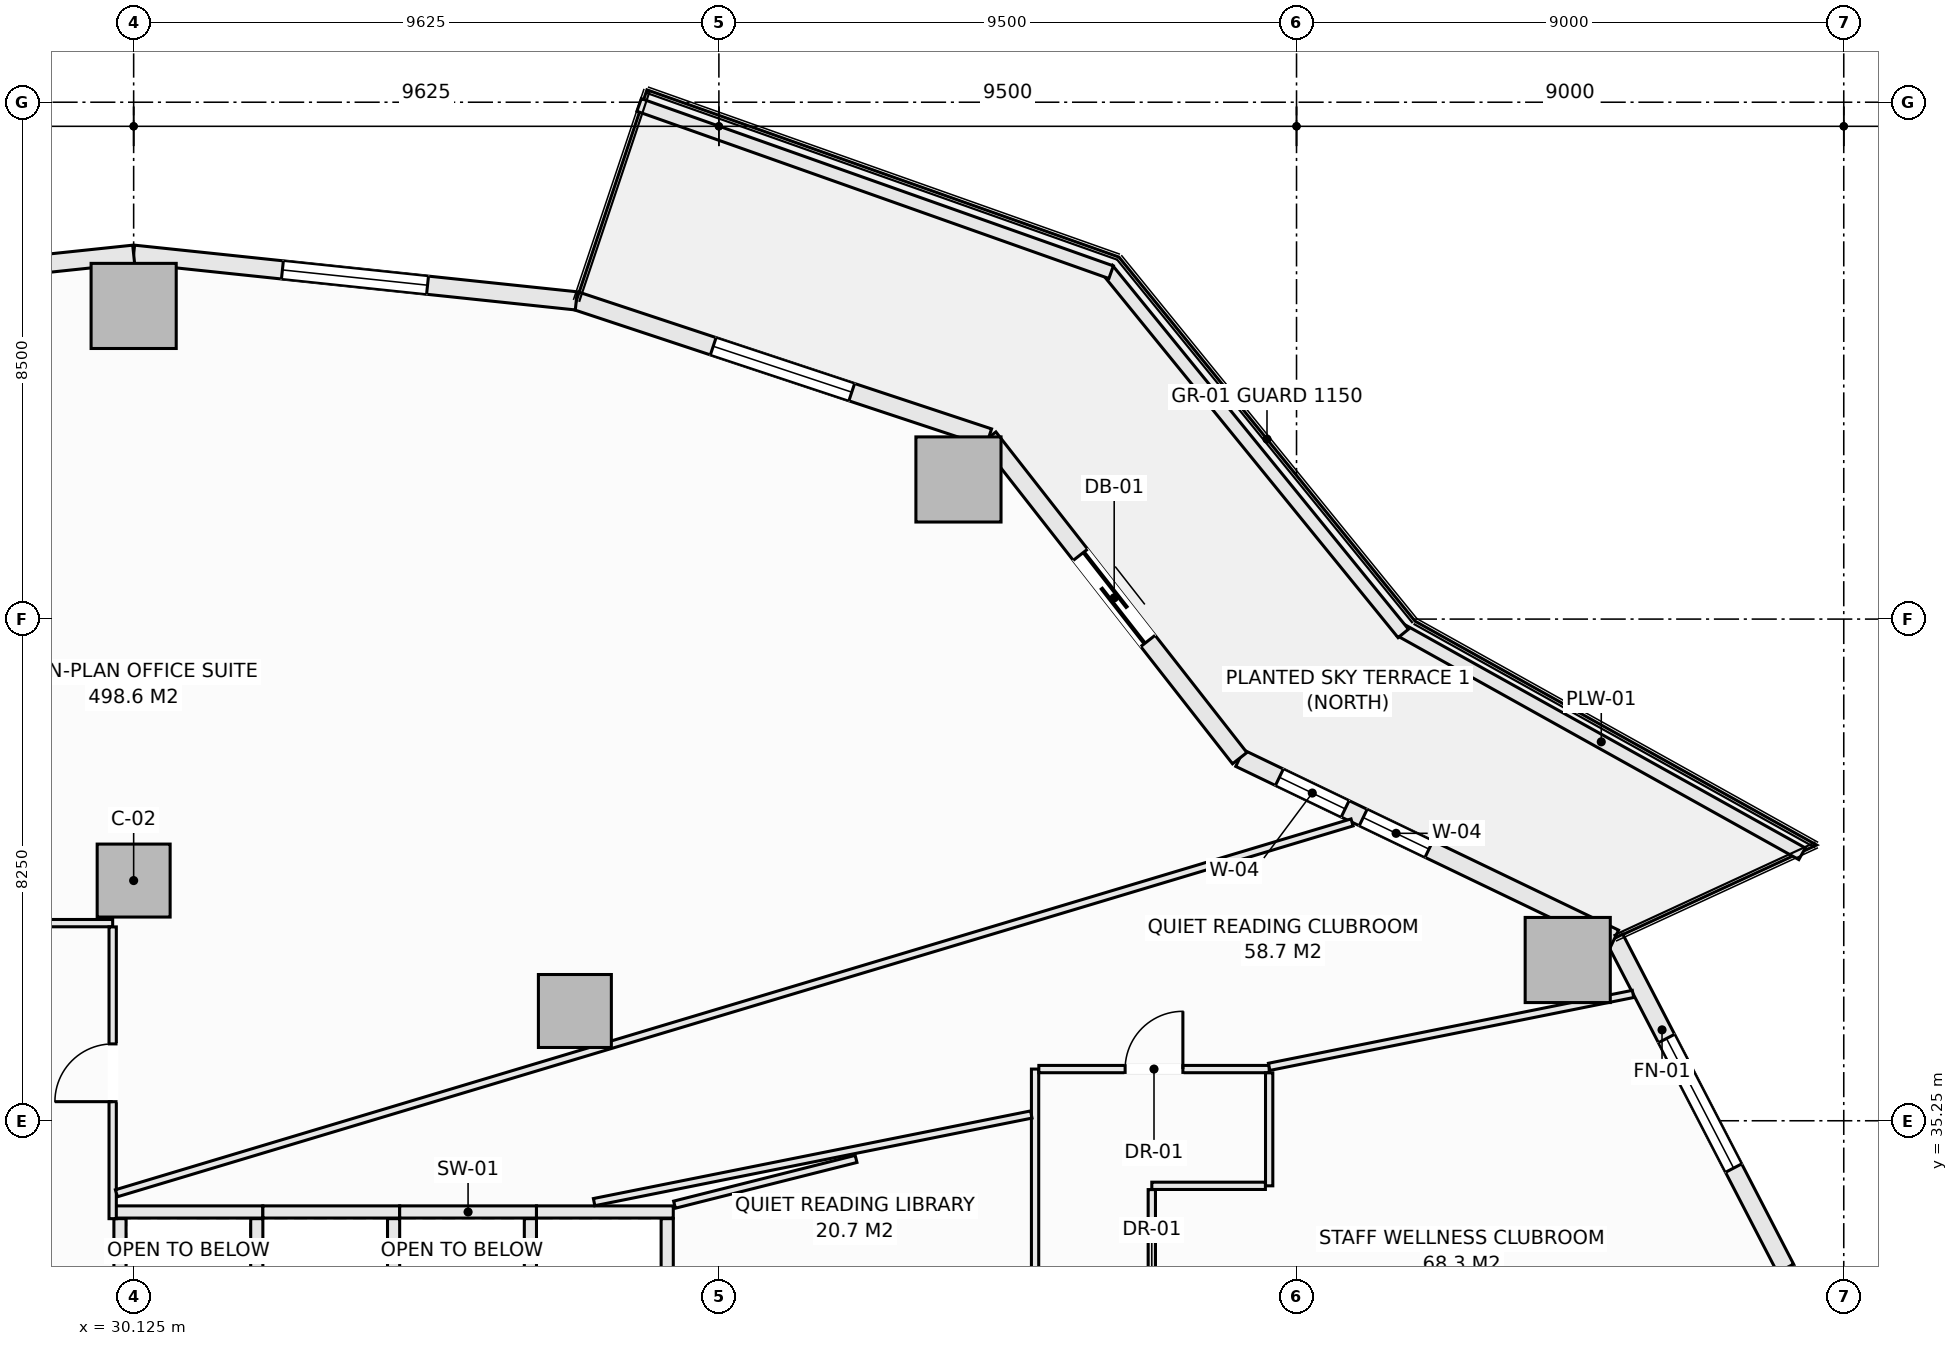
"""IFC4 building model, lengths in metres.
Left out: names, types, materials, properties, quantities, classifications, styles, units other than length and angle.
Written with IfcOpenShell. Run it as: python <this file> out.ifc"""

import sys

from ifc_helpers import new_model, si_unit, direction, frame, frame_2d, origin, origin_2d, place, context, subcontext, project, spatial, rectangle, extrude, element, fill, save


model = new_model("IFC4")
c1 = context("Model", 3, precision=1e-05, world=origin(), true_north=direction((0.0, 1.0)))
c2 = subcontext(c1, "Body", "Model", "MODEL_VIEW")
j1 = project(units=[si_unit("LENGTHUNIT", "METRE"), si_unit("PLANEANGLEUNIT", "RADIAN")], contexts=[c1])
p1 = place(None, origin())
s1 = spatial("IfcSite", under=j1, at=p1, CompositionType="ELEMENT")
p2 = place(p1, origin())
s2 = spatial("IfcBuilding", under=s1, at=p2, CompositionType="ELEMENT")
p3 = place(p2, frame((0.0, 0.0, 49.6)))
s3 = spatial("IfcBuildingStorey", under=s2, at=p3, CompositionType="ELEMENT", Elevation=49.6)
for number, where, z_axis, x_axis in (
    (1, (53.71, 37.894, -0.28), (0.0, 0.0, 1.0), (1.0, 0.0, 0.0)),
    (2, (43.69, 45.796, -0.28), (0.0, 0.0, 1.0), (1.0, 0.0, 0.0)),
    (3, (30.125, 48.65, -0.28), (0.0, 0.0, 1.0), (1.0, 0.0, 0.0)),
):
    element("IfcColumn", number, at=place(p3, frame(where, z_axis=z_axis, x_axis=x_axis)), inside=s3, PredefinedType="COLUMN", context=c2, shape_type="SweptSolid", body=[
        extrude(rectangle(XDim=1.4, YDim=1.4, at=origin_2d()), origin(), (0.0, 0.0, 1.0), 3.85),
    ])
for number, where, z_axis, x_axis in (
    (4, (37.382, 37.055, -0.28), (0.0, 0.0, 1.0), (1.0, 0.0, 0.0)),
    (5, (30.125, 39.2, -0.28), (0.0, 0.0, 1.0), (1.0, 0.0, 0.0)),
):
    element("IfcColumn", number, at=place(p3, frame(where, z_axis=z_axis, x_axis=x_axis)), inside=s3, PredefinedType="COLUMN", context=c2, shape_type="SweptSolid", body=[
        extrude(rectangle(XDim=1.2, YDim=1.2, at=origin_2d()), origin(), (0.0, 0.0, 1.0), 3.85),
    ])
p4 = place(p3, frame((54.482, 38.25, 0.0), z_axis=(0.0, 0.0, 1.0), x_axis=(0.459809804413, -0.88801742312, 0.0)))
e6 = element("IfcWall", 6, at=p4, inside=s3, PredefinedType="SOLIDWALL", context=c2, shape_type="SweptSolid", body=[
    extrude(rectangle(XDim=6.111, YDim=0.3, at=frame_2d((3.055, 0.0))), origin(), (0.0, 0.0, 1.0), 3.093),
])
p5 = place(p4, frame((1.855, 0.0, 0.85)))
e7 = element("IfcOpeningElement", 7, at=p5, cuts=e6, PredefinedType="OPENING", context=c2, shape_type="SweptSolid", body=[
    extrude(rectangle(XDim=2.4, YDim=1.9, at=frame_2d((1.2, 0.95))), frame((0.0, 0.16, 0.0), z_axis=(0.0, -1.0, 0.0), x_axis=(1.0, 0.0, 0.0)), (0.0, 0.0, 1.0), 0.32),
])
p6 = place(p3, frame((48.315, 41.213, 0.0), z_axis=(0.0, 0.0, 1.0), x_axis=(0.901360393999, -0.433069786673, 0.0)))
e8 = element("IfcWall", 8, at=p6, inside=s3, PredefinedType="SOLIDWALL", context=c2, shape_type="SweptSolid", body=[
    extrude(rectangle(XDim=6.842, YDim=0.3, at=frame_2d((3.421, 0.0))), origin(), (0.0, 0.0, 1.0), 3.093),
])
p7 = place(p6, frame((0.724, 0.0, 0.85)))
e9 = element("IfcOpeningElement", 9, at=p7, cuts=e8, PredefinedType="OPENING", context=c2, shape_type="SweptSolid", body=[
    extrude(rectangle(XDim=1.2, YDim=1.9, at=frame_2d((0.6, 0.95))), frame((0.0, 0.16, 0.0), z_axis=(0.0, -1.0, 0.0), x_axis=(1.0, 0.0, 0.0)), (0.0, 0.0, 1.0), 0.32),
])
p8 = place(p6, frame((2.253, 0.0, 0.85)))
e10 = element("IfcOpeningElement", 10, at=p8, cuts=e8, PredefinedType="OPENING", context=c2, shape_type="SweptSolid", body=[
    extrude(rectangle(XDim=1.2, YDim=1.9, at=frame_2d((0.6, 0.95))), frame((0.0, 0.16, 0.0), z_axis=(0.0, -1.0, 0.0), x_axis=(1.0, 0.0, 0.0)), (0.0, 0.0, 1.0), 0.32),
])
p9 = place(p3, frame((44.188, 46.486, 0.0), z_axis=(0.0, 0.0, 1.0), x_axis=(0.616421309777, -0.787416515482, 0.0)))
e11 = element("IfcWall", 11, at=p9, inside=s3, PredefinedType="SOLIDWALL", context=c2, shape_type="SweptSolid", body=[
    extrude(rectangle(XDim=6.696, YDim=0.3, at=frame_2d((3.348, 0.0))), origin(), (0.0, 0.0, 1.0), 3.093),
])
p10 = place(p9, frame((2.448, 0.0, 0.0)))
e12 = element("IfcOpeningElement", 12, at=p10, cuts=e11, PredefinedType="OPENING", context=c2, shape_type="SweptSolid", body=[
    extrude(rectangle(XDim=1.8, YDim=2.25, at=frame_2d((0.9, 1.125))), frame((0.0, 0.16, 0.0), z_axis=(0.0, -1.0, 0.0), x_axis=(1.0, 0.0, 0.0)), (0.0, 0.0, 1.0), 0.32),
])
p11 = place(p3, frame((37.404, 48.733, 0.0), z_axis=(0.0, 0.0, 1.0), x_axis=(0.949238715533, -0.31455661006, 0.0)))
e13 = element("IfcWall", 13, at=p11, inside=s3, PredefinedType="SOLIDWALL", context=c2, shape_type="SweptSolid", body=[
    extrude(rectangle(XDim=7.146, YDim=0.3, at=frame_2d((3.573, 0.0))), origin(), (0.0, 0.0, 1.0), 3.093),
])
p12 = place(p11, frame((2.373, 0.0, 0.85)))
e14 = element("IfcOpeningElement", 14, at=p12, cuts=e13, PredefinedType="OPENING", context=c2, shape_type="SweptSolid", body=[
    extrude(rectangle(XDim=2.4, YDim=1.9, at=frame_2d((1.2, 0.95))), frame((0.0, 0.16, 0.0), z_axis=(0.0, -1.0, 0.0), x_axis=(1.0, 0.0, 0.0)), (0.0, 0.0, 1.0), 0.32),
])
p13 = place(p3, frame((30.125, 49.5, 0.0), z_axis=(0.0, 0.0, 1.0), x_axis=(0.994500334317, -0.104733399844, 0.0)))
e15 = element("IfcWall", 15, at=p13, inside=s3, PredefinedType="SOLIDWALL", context=c2, shape_type="SweptSolid", body=[
    extrude(rectangle(XDim=7.32, YDim=0.3, at=frame_2d((3.66, 0.0))), origin(), (0.0, 0.0, 1.0), 3.093),
])
p14 = place(p13, frame((2.46, 0.0, 0.85)))
e16 = element("IfcOpeningElement", 16, at=p14, cuts=e15, PredefinedType="OPENING", context=c2, shape_type="SweptSolid", body=[
    extrude(rectangle(XDim=2.4, YDim=1.9, at=frame_2d((1.2, 0.95))), frame((0.0, 0.16, 0.0), z_axis=(0.0, -1.0, 0.0), x_axis=(1.0, 0.0, 0.0)), (0.0, 0.0, 1.0), 0.32),
])
p15 = place(p3, frame((22.846, 48.733, 0.0), z_axis=(0.0, 0.0, 1.0), x_axis=(0.994500334317, 0.104733399844, 0.0)))
e17 = element("IfcWall", 17, at=p15, inside=s3, PredefinedType="SOLIDWALL", context=c2, shape_type="SweptSolid", body=[
    extrude(rectangle(XDim=7.32, YDim=0.3, at=frame_2d((3.66, 0.0))), origin(), (0.0, 0.0, 1.0), 3.093),
])
p16 = place(p15, frame((2.46, 0.0, 0.85)))
e18 = element("IfcOpeningElement", 18, at=p16, cuts=e17, PredefinedType="OPENING", context=c2, shape_type="SweptSolid", body=[
    extrude(rectangle(XDim=2.4, YDim=1.9, at=frame_2d((1.2, 0.95))), frame((0.0, 0.16, 0.0), z_axis=(0.0, -1.0, 0.0), x_axis=(1.0, 0.0, 0.0)), (0.0, 0.0, 1.0), 0.32),
])
p17 = place(p3, frame((50.959, 43.322, 0.0), z_axis=(0.0, 0.0, 1.0), x_axis=(0.873500119739, -0.48682393205, 0.0)))
e19 = element("IfcWall", 19, at=p17, inside=s3, PredefinedType="PARAPET", context=c2, shape_type="SweptSolid", body=[
    extrude(rectangle(XDim=7.562, YDim=0.22, at=frame_2d((3.781, 0.0))), origin(), (0.0, 0.0, 1.0), 0.52),
])
p18 = place(p3, frame((46.136, 49.251, 0.0), z_axis=(0.0, 0.0, 1.0), x_axis=(0.630997450658, -0.775784903993, 0.0)))
e20 = element("IfcWall", 20, at=p18, inside=s3, PredefinedType="PARAPET", context=c2, shape_type="SweptSolid", body=[
    extrude(rectangle(XDim=7.718, YDim=0.22, at=frame_2d((3.859, 0.0))), origin(), (0.0, 0.0, 1.0), 0.52),
])
p19 = place(p3, frame((38.438, 51.955, 0.0), z_axis=(0.0, 0.0, 1.0), x_axis=(0.942581348797, -0.333976647237, 0.0)))
e21 = element("IfcWall", 21, at=p19, inside=s3, PredefinedType="PARAPET", context=c2, shape_type="SweptSolid", body=[
    extrude(rectangle(XDim=8.236, YDim=0.22, at=frame_2d((4.118, 0.0))), origin(), (0.0, 0.0, 1.0), 0.52),
])
p20 = place(p3, frame((29.8, 33.75, 0.0), z_axis=(0.0, 0.0, 1.0), x_axis=(1.0, 0.0, 0.0)))
e22 = element("IfcWall", 22, at=p20, inside=s3, PredefinedType="SOLIDWALL", context=c2, shape_type="SweptSolid", body=[
    extrude(rectangle(XDim=2.45, YDim=0.2, at=frame_2d((1.225, 0.0))), origin(), (0.0, 0.0, 1.0), 3.57),
])
for number, where, z_axis, x_axis in (
    (23, (29.9, 31.21, 0.0), (0.0, 0.0, 1.0), (0.0, 1.0, 0.0)),
    (24, (32.15, 31.21, 0.0), (0.0, 0.0, 1.0), (0.0, 1.0, 0.0)),
):
    element("IfcWall", number, at=place(p3, frame(where, z_axis=z_axis, x_axis=x_axis)), inside=s3, PredefinedType="SOLIDWALL", context=c2, shape_type="SweptSolid", body=[
        extrude(rectangle(XDim=2.43, YDim=0.2, at=frame_2d((1.215, 0.0))), origin(), (0.0, 0.0, 1.0), 3.57),
    ])
p21 = place(p3, frame((32.25, 33.75, 0.0), z_axis=(0.0, 0.0, 1.0), x_axis=(1.0, 0.0, 0.0)))
e25 = element("IfcWall", 25, at=p21, inside=s3, PredefinedType="SOLIDWALL", context=c2, shape_type="SweptSolid", body=[
    extrude(rectangle(XDim=2.25, YDim=0.2, at=frame_2d((1.125, 0.0))), origin(), (0.0, 0.0, 1.0), 3.57),
])
p22 = place(p3, frame((34.4, 31.21, 0.0), z_axis=(0.0, 0.0, 1.0), x_axis=(0.0, 1.0, 0.0)))
e26 = element("IfcWall", 26, at=p22, inside=s3, PredefinedType="SOLIDWALL", context=c2, shape_type="SweptSolid", body=[
    extrude(rectangle(XDim=2.43, YDim=0.2, at=frame_2d((1.215, 0.0))), origin(), (0.0, 0.0, 1.0), 3.57),
])
p23 = place(p3, frame((34.5, 33.75, 0.0), z_axis=(0.0, 0.0, 1.0), x_axis=(1.0, 0.0, 0.0)))
e27 = element("IfcWall", 27, at=p23, inside=s3, PredefinedType="SOLIDWALL", context=c2, shape_type="SweptSolid", body=[
    extrude(rectangle(XDim=2.25, YDim=0.2, at=frame_2d((1.125, 0.0))), origin(), (0.0, 0.0, 1.0), 3.57),
])
p24 = place(p3, frame((36.65, 31.21, 0.0), z_axis=(0.0, 0.0, 1.0), x_axis=(0.0, 1.0, 0.0)))
e28 = element("IfcWall", 28, at=p24, inside=s3, PredefinedType="SOLIDWALL", context=c2, shape_type="SweptSolid", body=[
    extrude(rectangle(XDim=2.43, YDim=0.2, at=frame_2d((1.215, 0.0))), origin(), (0.0, 0.0, 1.0), 3.57),
])
p25 = place(p3, frame((36.75, 33.75, 0.0), z_axis=(0.0, 0.0, 1.0), x_axis=(1.0, 0.0, 0.0)))
e29 = element("IfcWall", 29, at=p25, inside=s3, PredefinedType="SOLIDWALL", context=c2, shape_type="SweptSolid", body=[
    extrude(rectangle(XDim=2.25, YDim=0.2, at=frame_2d((1.125, 0.0))), origin(), (0.0, 0.0, 1.0), 3.57),
])
p26 = place(p3, frame((38.9, 31.21, 0.0), z_axis=(0.0, 0.0, 1.0), x_axis=(0.0, 1.0, 0.0)))
e30 = element("IfcWall", 30, at=p26, inside=s3, PredefinedType="SOLIDWALL", context=c2, shape_type="SweptSolid", body=[
    extrude(rectangle(XDim=2.43, YDim=0.2, at=frame_2d((1.215, 0.0))), origin(), (0.0, 0.0, 1.0), 3.57),
])
p27 = place(p3, frame((27.25, 38.5, 0.0), z_axis=(0.0, 0.0, 1.0), x_axis=(1.0, 0.0, 0.0)))
e31 = element("IfcWall", 31, at=p27, inside=s3, PredefinedType="PARTITIONING", context=c2, shape_type="SweptSolid", body=[
    extrude(rectangle(XDim=2.53, YDim=0.12, at=frame_2d((1.265, 0.0))), origin(), (0.0, 0.0, 1.0), 3.57),
])
p28 = place(p3, frame((29.78, 33.64, 0.0), z_axis=(0.0, 0.0, 1.0), x_axis=(0.0, 1.0, 0.0)))
e32 = element("IfcWall", 32, at=p28, inside=s3, PredefinedType="PARTITIONING", context=c2, shape_type="SweptSolid", body=[
    extrude(rectangle(XDim=4.798, YDim=0.12, at=frame_2d((2.399, 0.0))), origin(), (0.0, 0.0, 1.0), 3.57),
])
p29 = place(p28, frame((1.924, 0.0, 0.0)))
e33 = element("IfcOpeningElement", 33, at=p29, cuts=e32, PredefinedType="OPENING", context=c2, shape_type="SweptSolid", body=[
    extrude(rectangle(XDim=0.95, YDim=2.1, at=frame_2d((0.475, 1.05))), frame((0.0, 0.07, 0.0), z_axis=(0.0, -1.0, 0.0), x_axis=(1.0, 0.0, 0.0)), (0.0, 0.0, 1.0), 0.14),
])
p30 = place(p3, frame((44.95, 31.182, 0.0), z_axis=(0.0, 0.0, 1.0), x_axis=(0.0, 1.0, 0.0)))
e34 = element("IfcWall", 34, at=p30, inside=s3, PredefinedType="PARTITIONING", context=c2, shape_type="SweptSolid", body=[
    extrude(rectangle(XDim=4.918, YDim=0.12, at=frame_2d((2.459, 0.0))), origin(), (0.0, 0.0, 1.0), 3.57),
])
p31 = place(p3, frame((45.012, 36.1, 0.0), z_axis=(0.0, 0.0, 1.0), x_axis=(1.0, 0.0, 0.0)))
e35 = element("IfcWall", 35, at=p31, inside=s3, PredefinedType="PARTITIONING", context=c2, shape_type="SweptSolid", body=[
    extrude(rectangle(XDim=3.788, YDim=0.12, at=frame_2d((1.894, 0.0))), origin(), (0.0, 0.0, 1.0), 2.362),
])
p32 = place(p31, frame((1.419, 0.0, 0.0)))
e36 = element("IfcOpeningElement", 36, at=p32, cuts=e35, PredefinedType="OPENING", context=c2, shape_type="SweptSolid", body=[
    extrude(rectangle(XDim=0.95, YDim=2.1, at=frame_2d((0.475, 1.05))), frame((0.0, 0.07, 0.0), z_axis=(0.0, -1.0, 0.0), x_axis=(1.0, 0.0, 0.0)), (0.0, 0.0, 1.0), 0.14),
])
p33 = place(p3, frame((48.8, 34.18, 0.0), z_axis=(0.0, 0.0, 1.0), x_axis=(0.0, 1.0, 0.0)))
e37 = element("IfcWall", 37, at=p33, inside=s3, PredefinedType="PARTITIONING", context=c2, shape_type="SweptSolid", body=[
    extrude(rectangle(XDim=1.858, YDim=0.12, at=frame_2d((0.929, 0.0))), origin(), (0.0, 0.0, 1.0), 3.57),
])
p34 = place(p3, frame((46.87, 34.18, 0.0), z_axis=(0.0, 0.0, 1.0), x_axis=(1.0, 0.0, 0.0)))
e38 = element("IfcWall", 38, at=p34, inside=s3, PredefinedType="PARTITIONING", context=c2, shape_type="SweptSolid", body=[
    extrude(rectangle(XDim=1.868, YDim=0.12, at=frame_2d((0.934, 0.0))), origin(), (0.0, 0.0, 1.0), 3.57),
])
p35 = place(p3, frame((46.87, 19.32, 0.0), z_axis=(0.0, 0.0, 1.0), x_axis=(0.0, 1.0, 0.0)))
e39 = element("IfcWall", 39, at=p35, inside=s3, PredefinedType="PARTITIONING", context=c2, shape_type="SweptSolid", body=[
    extrude(rectangle(XDim=14.798, YDim=0.12, at=frame_2d((7.399, 0.0))), origin(), (0.0, 0.0, 1.0), 3.57),
])
p36 = place(p35, frame((5.265, 0.0, 0.0)))
e40 = element("IfcOpeningElement", 40, at=p36, cuts=e39, PredefinedType="OPENING", context=c2, shape_type="SweptSolid", body=[
    extrude(rectangle(XDim=0.95, YDim=2.1, at=frame_2d((0.475, 1.05))), frame((0.0, 0.07, 0.0), z_axis=(0.0, -1.0, 0.0), x_axis=(1.0, 0.0, 0.0)), (0.0, 0.0, 1.0), 0.14),
])
p37 = place(p35, frame((11.845, 0.0, 0.0)))
e41 = element("IfcOpeningElement", 41, at=p37, cuts=e39, PredefinedType="OPENING", context=c2, shape_type="SweptSolid", body=[
    extrude(rectangle(XDim=0.95, YDim=2.1, at=frame_2d((0.475, 1.05))), frame((0.0, 0.07, 0.0), z_axis=(0.0, -1.0, 0.0), x_axis=(1.0, 0.0, 0.0)), (0.0, 0.0, 1.0), 0.14),
])
p38 = place(p3, frame((37.698, 33.912, 0.0), z_axis=(0.0, 0.0, 1.0), x_axis=(0.980510182708, 0.196468271245, 0.0)))
e42 = element("IfcWall", 42, at=p38, inside=s3, PredefinedType="PARTITIONING", context=c2, shape_type="SweptSolid", body=[
    extrude(rectangle(XDim=7.333, YDim=0.12, at=frame_2d((3.667, 0.0))), origin(), (0.0, 0.0, 1.0), 3.57),
])
p39 = place(p3, frame((48.8, 36.137, 0.0), z_axis=(0.0, 0.0, 1.0), x_axis=(0.980512919928, 0.196454610165, 0.0)))
e43 = element("IfcWall", 43, at=p39, inside=s3, PredefinedType="PARTITIONING", context=c2, shape_type="SweptSolid", body=[
    extrude(rectangle(XDim=6.103, YDim=0.12, at=frame_2d((3.052, 0.0))), origin(), (0.0, 0.0, 1.0), 2.362),
])
p40 = place(p3, frame((39.02, 33.87, 0.0), z_axis=(0.0, 0.0, 1.0), x_axis=(0.969711955751, 0.244251351837, 0.0)))
e44 = element("IfcWall", 44, at=p40, inside=s3, PredefinedType="PARTITIONING", context=c2, shape_type="SweptSolid", body=[
    extrude(rectangle(XDim=3.08, YDim=0.12, at=frame_2d((1.54, 0.0))), origin(), (0.0, 0.0, 1.0), 3.57),
])
p41 = place(p3, frame((29.842, 34.058, 0.0), z_axis=(0.0, 0.0, 1.0), x_axis=(0.957798094038, 0.287441839435, 0.0)))
e45 = element("IfcWall", 45, at=p41, inside=s3, PredefinedType="PARTITIONING", context=c2, shape_type="SweptSolid", body=[
    extrude(rectangle(XDim=21.217, YDim=0.12, at=frame_2d((10.608, 0.0))), origin(), (0.0, 0.0, 1.0), 3.205),
])
p42 = place(p5, origin())
e46 = element("IfcWindow", 46, at=p42, inside=s3, PartitioningType="SINGLE_PANEL", PredefinedType="WINDOW", context=c2, shape_type="SweptSolid", body=[
    extrude(rectangle(XDim=2.4, YDim=1.9, at=frame_2d((1.2, 0.95))), frame((0.0, 0.03, 0.0), z_axis=(0.0, -1.0, 0.0), x_axis=(1.0, 0.0, 0.0)), (0.0, 0.0, 1.0), 0.06),
])
fill(e7, e46)
p43 = place(p7, origin())
e47 = element("IfcWindow", 47, at=p43, inside=s3, PartitioningType="SINGLE_PANEL", PredefinedType="WINDOW", context=c2, shape_type="SweptSolid", body=[
    extrude(rectangle(XDim=1.2, YDim=1.9, at=frame_2d((0.6, 0.95))), frame((0.0, 0.03, 0.0), z_axis=(0.0, -1.0, 0.0), x_axis=(1.0, 0.0, 0.0)), (0.0, 0.0, 1.0), 0.06),
])
fill(e9, e47)
p44 = place(p10, origin())
e48 = element("IfcDoor", 48, at=p44, inside=s3, OperationType="SLIDING_TO_LEFT", PredefinedType="DOOR", context=c2, shape_type="SweptSolid", body=[
    extrude(rectangle(XDim=1.8, YDim=2.25, at=frame_2d((0.9, 1.125))), frame((0.0, 0.025, 0.0), z_axis=(0.0, -1.0, 0.0), x_axis=(1.0, 0.0, 0.0)), (0.0, 0.0, 1.0), 0.05),
])
fill(e12, e48)
p45 = place(p12, origin())
e49 = element("IfcWindow", 49, at=p45, inside=s3, PartitioningType="SINGLE_PANEL", PredefinedType="WINDOW", context=c2, shape_type="SweptSolid", body=[
    extrude(rectangle(XDim=2.4, YDim=1.9, at=frame_2d((1.2, 0.95))), frame((0.0, 0.03, 0.0), z_axis=(0.0, -1.0, 0.0), x_axis=(1.0, 0.0, 0.0)), (0.0, 0.0, 1.0), 0.06),
])
fill(e14, e49)
p46 = place(p14, origin())
e50 = element("IfcWindow", 50, at=p46, inside=s3, PartitioningType="SINGLE_PANEL", PredefinedType="WINDOW", context=c2, shape_type="SweptSolid", body=[
    extrude(rectangle(XDim=2.4, YDim=1.9, at=frame_2d((1.2, 0.95))), frame((0.0, 0.03, 0.0), z_axis=(0.0, -1.0, 0.0), x_axis=(1.0, 0.0, 0.0)), (0.0, 0.0, 1.0), 0.06),
])
fill(e16, e50)
p47 = place(p32, origin())
e51 = element("IfcDoor", 51, at=p47, inside=s3, OperationType="SINGLE_SWING_RIGHT", PredefinedType="DOOR", context=c2, shape_type="SweptSolid", body=[
    extrude(rectangle(XDim=0.95, YDim=2.1, at=frame_2d((0.475, 1.05))), frame((0.0, 0.025, 0.0), z_axis=(0.0, -1.0, 0.0), x_axis=(1.0, 0.0, 0.0)), (0.0, 0.0, 1.0), 0.05),
])
fill(e36, e51)
p48 = place(p29, origin())
e52 = element("IfcDoor", 52, at=p48, inside=s3, OperationType="SINGLE_SWING_LEFT", PredefinedType="DOOR", context=c2, shape_type="SweptSolid", body=[
    extrude(rectangle(XDim=0.95, YDim=2.1, at=frame_2d((0.475, 1.05))), frame((0.0, 0.025, 0.0), z_axis=(0.0, -1.0, 0.0), x_axis=(1.0, 0.0, 0.0)), (0.0, 0.0, 1.0), 0.05),
])
fill(e33, e52)
p49 = place(p8, origin())
e53 = element("IfcWindow", 53, at=p49, inside=s3, PartitioningType="SINGLE_PANEL", PredefinedType="WINDOW", context=c2, shape_type="SweptSolid", body=[
    extrude(rectangle(XDim=1.2, YDim=1.9, at=frame_2d((0.6, 0.95))), frame((0.0, 0.03, 0.0), z_axis=(0.0, -1.0, 0.0), x_axis=(1.0, 0.0, 0.0)), (0.0, 0.0, 1.0), 0.06),
])
fill(e10, e53)
save(model, sys.argv[1])
